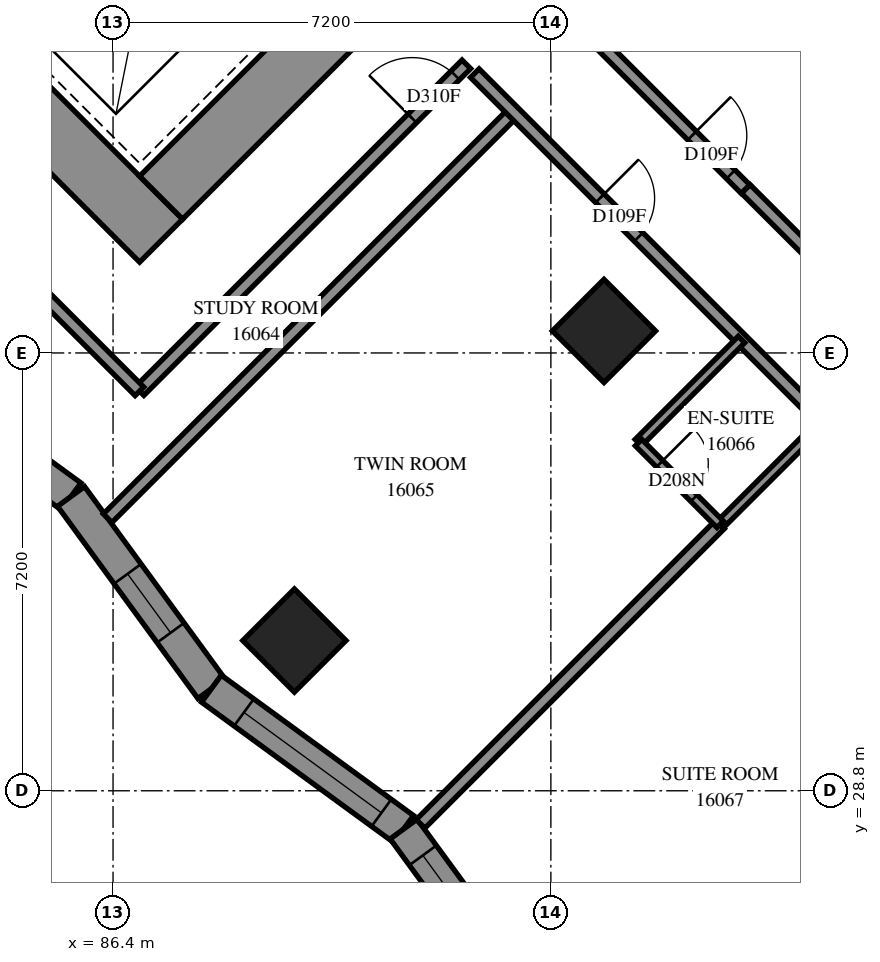
"""IFC4 building model, lengths in metres.
Left out: names, types, materials, properties, quantities, classifications, styles, units other than length and angle.
Written with IfcOpenShell. Run it as: python <this file> out.ifc"""

import sys

from ifc_helpers import new_model, si_unit, direction, frame, frame_2d, origin, origin_2d, place, context, subcontext, project, spatial, polyline, rectangle, outline, extrude, element, fill, save


model = new_model("IFC4")
c1 = context("Model", 3, precision=1e-05, world=origin(), true_north=direction((0.0, 1.0)))
c2 = subcontext(c1, "Body", "Model", "MODEL_VIEW")
j1 = project(units=[si_unit("LENGTHUNIT", "METRE"), si_unit("PLANEANGLEUNIT", "RADIAN")], contexts=[c1])
p1 = place(None, origin())
s1 = spatial("IfcSite", under=j1, at=p1, CompositionType="ELEMENT")
p2 = place(p1, origin())
s2 = spatial("IfcBuilding", under=s1, at=p2, CompositionType="ELEMENT")
p3 = place(p2, frame((0.0, 0.0, 61.0)))
s3 = spatial("IfcBuildingStorey", under=s2, at=p3, CompositionType="ELEMENT", Elevation=61.0)
for number, where, z_axis, x_axis in (
    (1, (94.474, 36.362, 0.0), (0.0, 0.0, 1.0), (0.707, -0.707, 0.0)),
    (2, (89.382, 31.271, 0.0), (0.0, 0.0, 1.0), (0.707, -0.707, 0.0)),
):
    element("IfcColumn", number, at=place(p3, frame(where, z_axis=z_axis, x_axis=x_axis)), inside=s3, PredefinedType="COLUMN", context=c2, shape_type="SweptSolid", body=[
        extrude(rectangle(XDim=1.2, YDim=1.2, at=origin_2d()), origin(), (0.0, 0.0, 1.0), 3.1),
    ])
p4 = place(p3, frame((75.594, 49.443, -0.3), z_axis=(0.0, 0.0, 1.0), x_axis=(0.7071037324, -0.70710983, 0.0)))
e3 = element("IfcWall", 3, at=p4, inside=s3, PredefinedType="SHEAR", context=c2, shape_type="SweptSolid", body=[
    extrude(rectangle(XDim=16.4, YDim=1.0, at=frame_2d((8.2, 0.0))), origin(), (0.0, 0.0, 1.0), 2.7),
])
p5 = place(p3, frame((87.19, 38.554, -0.3), z_axis=(0.0, 0.0, 1.0), x_axis=(0.707103309, 0.7071102534, 0.0)))
e4 = element("IfcWall", 4, at=p5, inside=s3, PredefinedType="SHEAR", context=c2, shape_type="SweptSolid", body=[
    extrude(rectangle(XDim=14.4, YDim=1.0, at=frame_2d((7.2, 0.0))), origin(), (0.0, 0.0, 1.0), 2.7),
])
p6 = place(p5, frame((4.55, 0.0, 0.3)))
e5 = element("IfcOpeningElement", 5, at=p6, cuts=e4, PredefinedType="OPENING", context=c2, shape_type="SweptSolid", body=[
    extrude(rectangle(XDim=1.1, YDim=2.1, at=frame_2d((0.55, 1.05))), frame((0.0, 0.51, 0.0), z_axis=(0.0, -1.0, 0.0), x_axis=(1.0, 0.0, 0.0)), (0.0, 0.0, 1.0), 1.02),
])
p7 = place(p5, frame((11.35, 0.0, 0.3)))
e6 = element("IfcOpeningElement", 6, at=p7, cuts=e4, PredefinedType="OPENING", context=c2, shape_type="SweptSolid", body=[
    extrude(rectangle(XDim=1.1, YDim=2.1, at=frame_2d((0.55, 1.05))), frame((0.0, 0.51, 0.0), z_axis=(0.0, -1.0, 0.0), x_axis=(1.0, 0.0, 0.0)), (0.0, 0.0, 1.0), 1.02),
])
p8 = place(p3, frame((82.548, 35.949, 0.0), z_axis=(0.0, 0.0, 1.0), x_axis=(0.8075900138, -0.5897443257, 0.0)))
e7 = element("IfcWall", 7, at=p8, inside=s3, PredefinedType="SOLIDWALL", context=c2, shape_type="SweptSolid", body=[
    extrude(outline(polyline([(-0.043, -0.275), (3.871, -0.275), (3.957, 0.275), (0.043, 0.275), (-0.043, -0.275)])), origin(), (0.0, 0.0, 1.0), 3.1),
])
p9 = place(p8, frame((1.733, 0.0, 0.5)))
e8 = element("IfcOpeningElement", 8, at=p9, cuts=e7, PredefinedType="OPENING", context=c2, shape_type="SweptSolid", body=[
    extrude(rectangle(XDim=1.2, YDim=2.45, at=frame_2d((0.6, 1.225))), frame((0.0, 0.285, 0.0), z_axis=(0.0, -1.0, 0.0), x_axis=(1.0, 0.0, 0.0)), (0.0, 0.0, 1.0), 0.57),
])
p10 = place(p3, frame((85.709, 33.64, 0.0), z_axis=(0.0, 0.0, 1.0), x_axis=(0.5897321582, -0.807598899, 0.0)))
e9 = element("IfcWall", 9, at=p10, inside=s3, PredefinedType="SOLIDWALL", context=c2, shape_type="SweptSolid", body=[
    extrude(outline(polyline([(0.043, -0.275), (3.957, -0.275), (3.871, 0.275), (-0.043, 0.275), (0.043, -0.275)])), origin(), (0.0, 0.0, 1.0), 3.1),
])
p11 = place(p10, frame((1.576, 0.0, 0.5)))
e10 = element("IfcOpeningElement", 10, at=p11, cuts=e9, PredefinedType="OPENING", context=c2, shape_type="SweptSolid", body=[
    extrude(rectangle(XDim=1.2, YDim=2.45, at=frame_2d((0.6, 1.225))), frame((0.0, 0.285, 0.0), z_axis=(0.0, -1.0, 0.0), x_axis=(1.0, 0.0, 0.0)), (0.0, 0.0, 1.0), 0.57),
])
p12 = place(p3, frame((88.018, 30.479, 0.0), z_axis=(0.0, 0.0, 1.0), x_axis=(0.8076021815, -0.589727663, 0.0)))
e11 = element("IfcWall", 11, at=p12, inside=s3, PredefinedType="SOLIDWALL", context=c2, shape_type="SweptSolid", body=[
    extrude(outline(polyline([(-0.043, -0.275), (3.871, -0.275), (3.957, 0.275), (0.043, 0.275), (-0.043, -0.275)])), origin(), (0.0, 0.0, 1.0), 3.1),
])
p13 = place(p12, frame((0.662, 0.0, 0.5)))
e12 = element("IfcOpeningElement", 12, at=p13, cuts=e11, PredefinedType="OPENING", context=c2, shape_type="SweptSolid", body=[
    extrude(rectangle(XDim=2.8, YDim=2.45, at=frame_2d((1.4, 1.225))), frame((0.0, 0.285, 0.0), z_axis=(0.0, -1.0, 0.0), x_axis=(1.0, 0.0, 0.0)), (0.0, 0.0, 1.0), 0.57),
])
p14 = place(p3, frame((91.179, 28.171, 0.0), z_axis=(0.0, 0.0, 1.0), x_axis=(0.5897321582, -0.807598899, 0.0)))
e13 = element("IfcWall", 13, at=p14, inside=s3, PredefinedType="SOLIDWALL", context=c2, shape_type="SweptSolid", body=[
    extrude(outline(polyline([(0.043, -0.275), (3.957, -0.275), (3.871, 0.275), (-0.043, 0.275), (0.043, -0.275)])), origin(), (0.0, 0.0, 1.0), 3.1),
])
p15 = place(p14, frame((0.536, 0.0, 0.5)))
e14 = element("IfcOpeningElement", 14, at=p15, cuts=e13, PredefinedType="OPENING", context=c2, shape_type="SweptSolid", body=[
    extrude(rectangle(XDim=2.8, YDim=2.45, at=frame_2d((1.4, 1.225))), frame((0.0, 0.285, 0.0), z_axis=(0.0, -1.0, 0.0), x_axis=(1.0, 0.0, 0.0)), (0.0, 0.0, 1.0), 0.57),
])
p16 = place(p3, frame((86.311, 33.282, 0.0), z_axis=(0.0, 0.0, 1.0), x_axis=(0.7069956462, 0.7072178987, 0.0)))
e15 = element("IfcWall", 15, at=p16, inside=s3, PredefinedType="PARTITIONING", context=c2, shape_type="SweptSolid", body=[
    extrude(rectangle(XDim=9.449, YDim=0.2, at=frame_2d((4.724, 0.0))), origin(), (0.0, 0.0, 1.0), 3.1),
])
p17 = place(p3, frame((92.349, 40.601, 0.0), z_axis=(0.0, 0.0, 1.0), x_axis=(0.7071067812, -0.7071067812, 0.0)))
e16 = element("IfcWall", 16, at=p17, inside=s3, PredefinedType="PARTITIONING", context=c2, shape_type="SweptSolid", body=[
    extrude(rectangle(XDim=8.101, YDim=0.2, at=frame_2d((4.05, 0.0))), origin(), (0.0, 0.0, 1.0), 3.1),
])
p18 = place(p17, frame((2.909, 0.0, 0.0)))
e17 = element("IfcOpeningElement", 17, at=p18, cuts=e16, PredefinedType="OPENING", context=c2, shape_type="SweptSolid", body=[
    extrude(rectangle(XDim=0.9, YDim=2.1, at=frame_2d((0.45, 1.05))), frame((0.0, 0.11, 0.0), z_axis=(0.0, -1.0, 0.0), x_axis=(1.0, 0.0, 0.0)), (0.0, 0.0, 1.0), 0.22),
])
p19 = place(p3, frame((86.836, 35.372, 0.0), z_axis=(0.0, 0.0, 1.0), x_axis=(0.7071067812, 0.7071067812, 0.0)))
e18 = element("IfcWall", 18, at=p19, inside=s3, PredefinedType="PARTITIONING", context=c2, shape_type="SweptSolid", body=[
    extrude(rectangle(XDim=7.6, YDim=0.2, at=frame_2d((3.8, 0.0))), origin(), (0.0, 0.0, 1.0), 3.1),
])
p20 = place(p19, frame((6.342, 0.0, 0.0)))
e19 = element("IfcOpeningElement", 19, at=p20, cuts=e18, PredefinedType="OPENING", context=c2, shape_type="SweptSolid", body=[
    extrude(rectangle(XDim=1.0, YDim=2.1, at=frame_2d((0.5, 1.05))), frame((0.0, 0.11, 0.0), z_axis=(0.0, -1.0, 0.0), x_axis=(1.0, 0.0, 0.0)), (0.0, 0.0, 1.0), 0.22),
])
p21 = place(p3, frame((96.519, 23.136, 0.0), z_axis=(0.0, 0.0, 1.0), x_axis=(0.7071067812, 0.7071067812, 0.0)))
e20 = element("IfcWall", 20, at=p21, inside=s3, PredefinedType="PARTITIONING", context=c2, shape_type="SweptSolid", body=[
    extrude(rectangle(XDim=7.005, YDim=0.2, at=frame_2d((3.503, 0.0))), origin(), (0.0, 0.0, 1.0), 3.1),
])
p22 = place(p3, frame((91.457, 28.256, 0.0), z_axis=(0.0, 0.0, 1.0), x_axis=(0.7071067812, 0.7071067812, 0.0)))
e21 = element("IfcWall", 21, at=p22, inside=s3, PredefinedType="PARTITIONING", context=c2, shape_type="SweptSolid", body=[
    extrude(rectangle(XDim=6.964, YDim=0.2, at=frame_2d((3.482, 0.0))), origin(), (0.0, 0.0, 1.0), 3.1),
])
p23 = place(p3, frame((93.481, 42.015, 0.0), z_axis=(0.0, 0.0, 1.0), x_axis=(0.7071067812, -0.7071067812, 0.0)))
e22 = element("IfcWall", 22, at=p23, inside=s3, PredefinedType="PARTITIONING", context=c2, shape_type="SweptSolid", body=[
    extrude(rectangle(XDim=4.698, YDim=0.2, at=frame_2d((2.349, 0.0))), origin(), (0.0, 0.0, 1.0), 3.1),
])
p24 = place(p23, frame((3.452, 0.0, 0.0)))
e23 = element("IfcOpeningElement", 23, at=p24, cuts=e22, PredefinedType="OPENING", context=c2, shape_type="SweptSolid", body=[
    extrude(rectangle(XDim=0.9, YDim=2.1, at=frame_2d((0.45, 1.05))), frame((0.0, 0.11, 0.0), z_axis=(0.0, -1.0, 0.0), x_axis=(1.0, 0.0, 0.0)), (0.0, 0.0, 1.0), 0.22),
])
p25 = place(p3, frame((85.065, 37.137, 0.0), z_axis=(0.0, 0.0, 1.0), x_axis=(0.7071067812, -0.7071067812, 0.0)))
e24 = element("IfcWall", 24, at=p25, inside=s3, PredefinedType="PARTITIONING", context=c2, shape_type="SweptSolid", body=[
    extrude(rectangle(XDim=2.5, YDim=0.2, at=frame_2d((1.25, 0.0))), origin(), (0.0, 0.0, 1.0), 3.1),
])
p26 = place(p3, frame((96.384, 33.178, 0.0), z_axis=(0.0, 0.0, 1.0), x_axis=(0.7075233388, 0.706689978, 0.0)))
e25 = element("IfcWall", 25, at=p26, inside=s3, PredefinedType="PARTITIONING", context=c2, shape_type="SweptSolid", body=[
    extrude(rectangle(XDim=2.4, YDim=0.15, at=frame_2d((1.2, 0.0))), origin(), (0.0, 0.0, 1.0), 3.1),
])
p27 = place(p3, frame((95.039, 34.525, 0.0), z_axis=(0.0, 0.0, 1.0), x_axis=(0.7071067812, 0.7071067812, 0.0)))
e26 = element("IfcWall", 26, at=p27, inside=s3, PredefinedType="PARTITIONING", context=c2, shape_type="SweptSolid", body=[
    extrude(rectangle(XDim=2.398, YDim=0.15, at=frame_2d((1.199, 0.0))), origin(), (0.0, 0.0, 1.0), 3.1),
])
p28 = place(p3, frame((95.042, 34.526, 0.0), z_axis=(0.0, 0.0, 1.0), x_axis=(0.7065800724, -0.7076330979, 0.0)))
e27 = element("IfcWall", 27, at=p28, inside=s3, PredefinedType="PARTITIONING", context=c2, shape_type="SweptSolid", body=[
    extrude(rectangle(XDim=1.899, YDim=0.15, at=frame_2d((0.95, 0.0))), origin(), (0.0, 0.0, 1.0), 3.1),
])
p29 = place(p28, frame((0.491, 0.0, 0.0)))
e28 = element("IfcOpeningElement", 28, at=p29, cuts=e27, PredefinedType="OPENING", context=c2, shape_type="SweptSolid", body=[
    extrude(rectangle(XDim=0.8, YDim=2.1, at=frame_2d((0.4, 1.05))), frame((0.0, 0.085, 0.0), z_axis=(0.0, -1.0, 0.0), x_axis=(1.0, 0.0, 0.0)), (0.0, 0.0, 1.0), 0.17),
])
p30 = place(p3, frame((96.806, 38.696, 0.0), z_axis=(0.0, 0.0, 1.0), x_axis=(0.7076943229, -0.7065187509, 0.0)))
e29 = element("IfcWall", 29, at=p30, inside=s3, PredefinedType="PARTITIONING", context=c2, shape_type="SweptSolid", body=[
    extrude(rectangle(XDim=1.701, YDim=0.2, at=frame_2d((0.851, 0.0))), origin(), (0.0, 0.0, 1.0), 3.1),
])
p31 = place(p11, origin())
e30 = element("IfcWindow", 30, at=p31, inside=s3, PartitioningType="SINGLE_PANEL", PredefinedType="WINDOW", context=c2, shape_type="SweptSolid", body=[
    extrude(rectangle(XDim=1.2, YDim=2.45, at=frame_2d((0.6, 1.225))), frame((0.0, 0.155, 0.0), z_axis=(0.0, -1.0, 0.0), x_axis=(1.0, 0.0, 0.0)), (0.0, 0.0, 1.0), 0.06),
])
fill(e10, e30)
p32 = place(p13, origin())
e31 = element("IfcWindow", 31, at=p32, inside=s3, PartitioningType="SINGLE_PANEL", PredefinedType="WINDOW", context=c2, shape_type="SweptSolid", body=[
    extrude(rectangle(XDim=2.8, YDim=2.45, at=frame_2d((1.4, 1.225))), frame((0.0, 0.155, 0.0), z_axis=(0.0, -1.0, 0.0), x_axis=(1.0, 0.0, 0.0)), (0.0, 0.0, 1.0), 0.06),
])
fill(e12, e31)
p33 = place(p15, origin())
e32 = element("IfcWindow", 32, at=p33, inside=s3, PartitioningType="SINGLE_PANEL", PredefinedType="WINDOW", context=c2, shape_type="SweptSolid", body=[
    extrude(rectangle(XDim=2.8, YDim=2.45, at=frame_2d((1.4, 1.225))), frame((0.0, 0.155, 0.0), z_axis=(0.0, -1.0, 0.0), x_axis=(1.0, 0.0, 0.0)), (0.0, 0.0, 1.0), 0.06),
])
fill(e14, e32)
p34 = place(p24, origin())
e33 = element("IfcDoor", 33, at=p34, inside=s3, OperationType="SINGLE_SWING_RIGHT", PredefinedType="DOOR", context=c2, shape_type="SweptSolid", body=[
    extrude(rectangle(XDim=0.9, YDim=2.1, at=frame_2d((0.45, 1.05))), frame((0.0, 0.025, 0.0), z_axis=(0.0, -1.0, 0.0), x_axis=(1.0, 0.0, 0.0)), (0.0, 0.0, 1.0), 0.05),
])
fill(e23, e33)
p35 = place(p20, origin())
e34 = element("IfcDoor", 34, at=p35, inside=s3, OperationType="SINGLE_SWING_RIGHT", PredefinedType="DOOR", context=c2, shape_type="SweptSolid", body=[
    extrude(rectangle(XDim=1.0, YDim=2.1, at=frame_2d((0.5, 1.05))), frame((0.0, 0.025, 0.0), z_axis=(0.0, -1.0, 0.0), x_axis=(1.0, 0.0, 0.0)), (0.0, 0.0, 1.0), 0.05),
])
fill(e19, e34)
p36 = place(p18, origin())
e35 = element("IfcDoor", 35, at=p36, inside=s3, OperationType="SINGLE_SWING_LEFT", PredefinedType="DOOR", context=c2, shape_type="SweptSolid", body=[
    extrude(rectangle(XDim=0.9, YDim=2.1, at=frame_2d((0.45, 1.05))), frame((0.0, 0.025, 0.0), z_axis=(0.0, -1.0, 0.0), x_axis=(1.0, 0.0, 0.0)), (0.0, 0.0, 1.0), 0.05),
])
fill(e17, e35)
p37 = place(p29, origin())
e36 = element("IfcDoor", 36, at=p37, inside=s3, OperationType="SINGLE_SWING_RIGHT", PredefinedType="DOOR", context=c2, shape_type="SweptSolid", body=[
    extrude(rectangle(XDim=0.8, YDim=2.1, at=frame_2d((0.4, 1.05))), frame((0.0, 0.025, 0.0), z_axis=(0.0, -1.0, 0.0), x_axis=(1.0, 0.0, 0.0)), (0.0, 0.0, 1.0), 0.05),
])
fill(e28, e36)
save(model, sys.argv[1])
